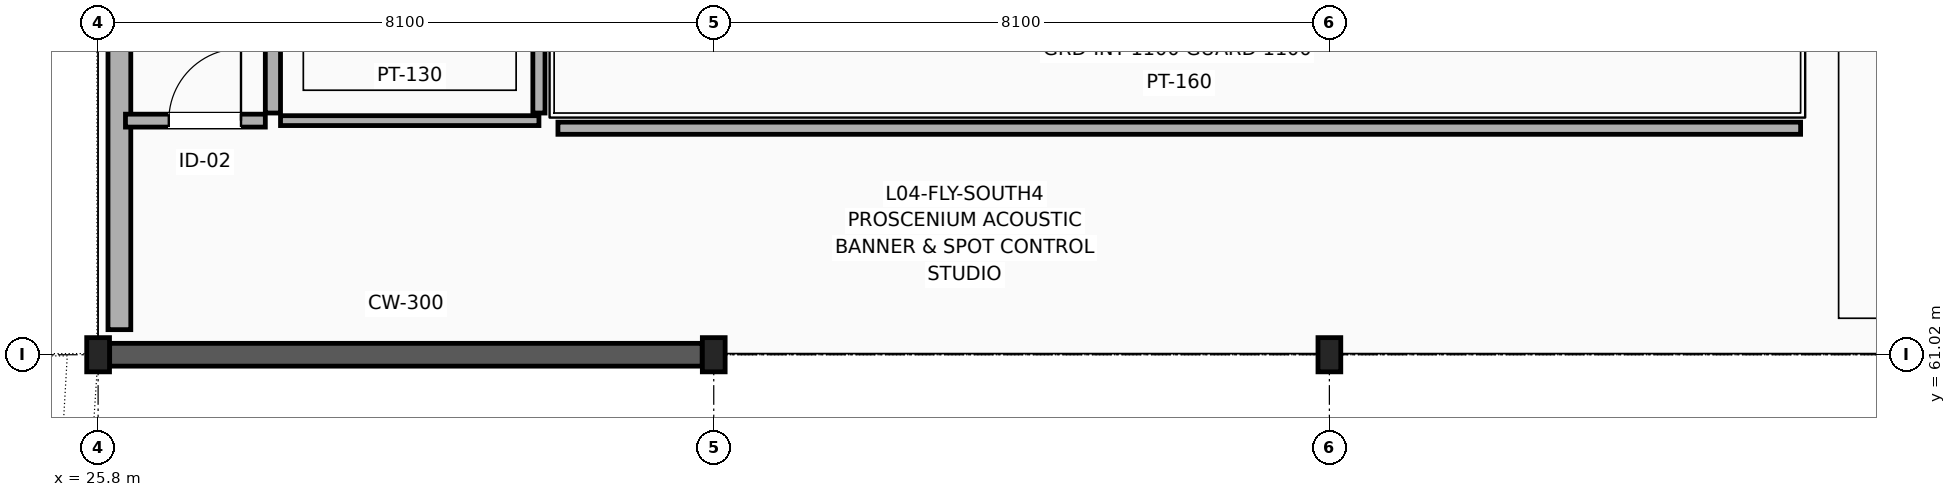
"""IFC4 building model, lengths in metres.
Left out: names, types, materials, properties, quantities, classifications, styles, units other than length and angle.
Written with IfcOpenShell. Run it as: python <this file> out.ifc"""

import sys

from ifc_helpers import new_model, si_unit, direction, frame, frame_2d, origin, origin_2d, place, context, subcontext, project, spatial, rectangle, i_section, extrude, element, fill, save


model = new_model("IFC4")
c1 = context("Model", 3, precision=1e-05, world=origin(), true_north=direction((0.0, 1.0)))
c2 = subcontext(c1, "Body", "Model", "MODEL_VIEW")
j1 = project(units=[si_unit("LENGTHUNIT", "METRE"), si_unit("PLANEANGLEUNIT", "RADIAN")], contexts=[c1])
p1 = place(None, origin())
s1 = spatial("IfcSite", under=j1, at=p1, CompositionType="ELEMENT")
p2 = place(p1, origin())
s2 = spatial("IfcBuilding", under=s1, at=p2, CompositionType="ELEMENT")
p3 = place(p2, frame((0.0, 0.0, 19.2)))
s3 = spatial("IfcBuildingStorey", under=s2, at=p3, CompositionType="ELEMENT", Elevation=19.2)
for number, where, z_axis, x_axis in (
    (1, (25.8, 61.02, 0.0), (0.0, 0.0, 1.0), (1.0, 0.0, 0.0)),
    (2, (33.9, 61.02, 0.0), (0.0, 0.0, 1.0), (1.0, 0.0, 0.0)),
    (3, (42.0, 61.02, 0.0), (0.0, 0.0, 1.0), (1.0, 0.0, 0.0)),
):
    element("IfcColumn", number, at=place(p3, frame(where, z_axis=z_axis, x_axis=x_axis)), inside=s3, PredefinedType="COLUMN", context=c2, shape_type="SweptSolid", body=[
        extrude(i_section(OverallWidth=0.3, OverallDepth=0.45, WebThickness=0.014, FlangeThickness=0.026, FilletRadius=0.027, at=origin_2d()), origin(), (0.0, 0.0, 1.0), 4.2),
    ])
p4 = place(p2, frame((0.0, 0.0, 14.7)))
s4 = spatial("IfcBuildingStorey", under=s2, at=p4, CompositionType="ELEMENT", Elevation=14.7)
p5 = place(p4, frame((25.458, 55.726, 0.0), z_axis=(0.0, 0.0, 1.0), x_axis=(0.064519893008, 0.997916421053, 0.0)))
e4 = element("IfcWall", 4, at=p5, inside=s4, PredefinedType="SHEAR", context=c2, shape_type="SweptSolid", body=[
    extrude(rectangle(XDim=5.585, YDim=0.4, at=frame_2d((2.792, 0.0))), origin(), (0.0, 0.0, 1.0), 7.097),
])
p6 = place(p3, frame((26.08, 61.35, 0.0), z_axis=(0.0, 0.0, 1.0), x_axis=(0.0, 1.0, 0.0)))
e5 = element("IfcWall", 5, at=p6, inside=s3, PredefinedType="SOLIDWALL", context=c2, shape_type="SweptSolid", body=[
    extrude(rectangle(XDim=17.95, YDim=0.3, at=frame_2d((8.975, 0.0))), origin(), (0.0, 0.0, 1.0), 3.345),
])
p7 = place(p3, frame((25.952, 61.02, 0.0), z_axis=(0.0, 0.0, 1.0), x_axis=(1.0, 0.0, 0.0)))
e6 = element("IfcWall", 6, at=p7, inside=s3, PredefinedType="SHEAR", context=c2, shape_type="SweptSolid", body=[
    extrude(rectangle(XDim=7.796, YDim=0.3, at=frame_2d((3.898, 0.0))), origin(), (0.0, 0.0, 1.0), 3.965),
])
p8 = place(p3, frame((28.1, 64.2, 0.0), z_axis=(0.0, 0.0, 1.0), x_axis=(0.0, 1.0, 0.0)))
e7 = element("IfcWall", 7, at=p8, inside=s3, PredefinedType="PARTITIONING", context=c2, shape_type="SweptSolid", body=[
    extrude(rectangle(XDim=11.4, YDim=0.2, at=frame_2d((5.7, 0.0))), origin(), (0.0, 0.0, 1.0), 3.945),
])
p9 = place(p8, frame((7.498, 0.0, 0.0)))
e8 = element("IfcOpeningElement", 8, at=p9, cuts=e7, PredefinedType="OPENING", context=c2, shape_type="SweptSolid", body=[
    extrude(rectangle(XDim=0.95, YDim=2.15, at=frame_2d((0.475, 1.075))), frame((0.0, 0.11, 0.0), z_axis=(0.0, -1.0, 0.0), x_axis=(1.0, 0.0, 0.0)), (0.0, 0.0, 1.0), 0.22),
])
p10 = place(p3, frame((26.16, 64.1, 0.0), z_axis=(0.0, 0.0, 1.0), x_axis=(1.0, 0.0, 0.0)))
e9 = element("IfcWall", 9, at=p10, inside=s3, PredefinedType="PARTITIONING", context=c2, shape_type="SweptSolid", body=[
    extrude(rectangle(XDim=1.84, YDim=0.17, at=frame_2d((0.92, 0.0))), origin(), (0.0, 0.0, 1.0), 3.945),
])
p11 = place(p10, frame((0.57, 0.0, 0.0)))
e10 = element("IfcOpeningElement", 10, at=p11, cuts=e9, PredefinedType="OPENING", context=c2, shape_type="SweptSolid", body=[
    extrude(rectangle(XDim=0.95, YDim=2.15, at=frame_2d((0.475, 1.075))), frame((0.0, 0.095, 0.0), z_axis=(0.0, -1.0, 0.0), x_axis=(1.0, 0.0, 0.0)), (0.0, 0.0, 1.0), 0.19),
])
p12 = place(p3, frame((28.2, 64.1, 0.0), z_axis=(0.0, 0.0, 1.0), x_axis=(1.0, 0.0, 0.0)))
e11 = element("IfcWall", 11, at=p12, inside=s3, PredefinedType="PARTITIONING", context=c2, shape_type="SweptSolid", body=[
    extrude(rectangle(XDim=3.4, YDim=0.13, at=frame_2d((1.7, 0.0))), origin(), (0.0, 0.0, 1.0), 3.945),
])
p13 = place(p3, frame((31.6, 64.2, 0.0), z_axis=(0.0, 0.0, 1.0), x_axis=(0.0, 1.0, 0.0)))
e12 = element("IfcWall", 12, at=p13, inside=s3, PredefinedType="PARTITIONING", context=c2, shape_type="SweptSolid", body=[
    extrude(rectangle(XDim=9.45, YDim=0.16, at=frame_2d((4.725, 0.0))), origin(), (0.0, 0.0, 1.0), 3.945),
])
p14 = place(p3, frame((31.85, 64.0, 0.0), z_axis=(0.0, 0.0, 1.0), x_axis=(1.0, 0.0, 0.0)))
e13 = element("IfcWall", 13, at=p14, inside=s3, PredefinedType="PARTITIONING", context=c2, shape_type="SweptSolid", body=[
    extrude(rectangle(XDim=16.35, YDim=0.16, at=frame_2d((8.175, 0.0))), origin(), (0.0, 0.0, 1.0), 3.945),
])
p15 = place(p11, origin())
e14 = element("IfcDoor", 14, at=p15, inside=s3, OperationType="SINGLE_SWING_RIGHT", PredefinedType="DOOR", context=c2, shape_type="SweptSolid", body=[
    extrude(rectangle(XDim=0.95, YDim=2.15, at=frame_2d((0.475, 1.075))), frame((0.0, 0.025, 0.0), z_axis=(0.0, -1.0, 0.0), x_axis=(1.0, 0.0, 0.0)), (0.0, 0.0, 1.0), 0.05),
])
fill(e10, e14)
save(model, sys.argv[1])
